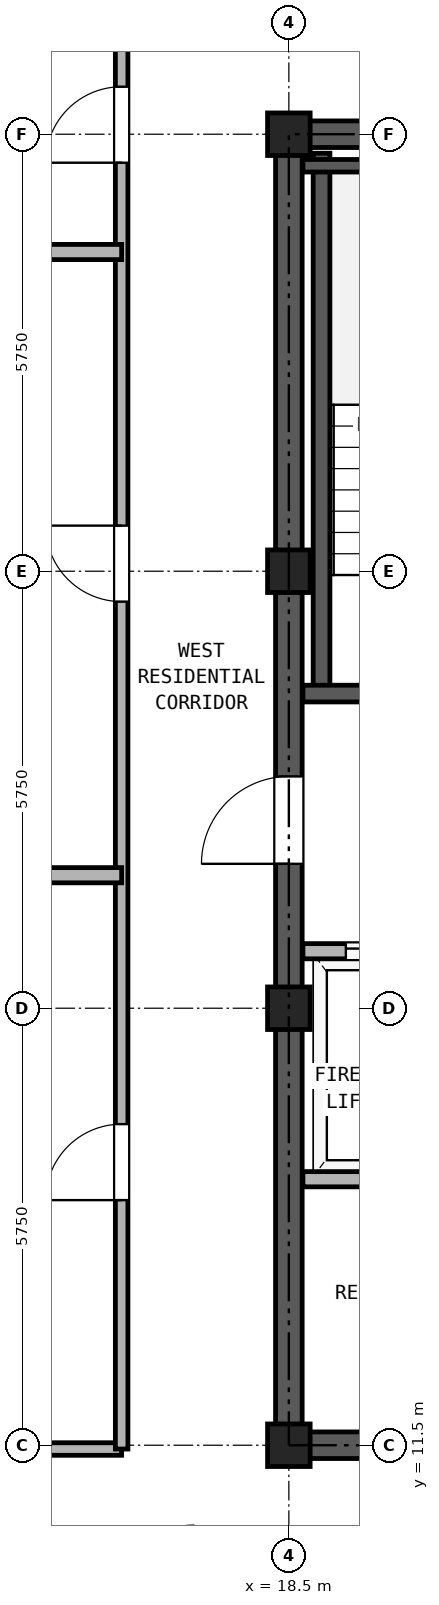
"""IFC4 building model, lengths in metres.
Left out: names, types, materials, properties, quantities, classifications, styles, units other than length and angle.
Written with IfcOpenShell. Run it as: python <this file> out.ifc"""

import sys

from ifc_helpers import new_model, si_unit, direction, frame, frame_2d, origin, origin_2d, place, context, subcontext, project, spatial, rectangle, hollow_rectangle, extrude, source, transform, mapped, element, fill, save


model = new_model("IFC4")
c1 = context("Model", 3, precision=1e-05, world=origin(), true_north=direction((0.0, 1.0)))
c2 = subcontext(c1, "Body", "Model", "MODEL_VIEW")
j1 = project(units=[si_unit("LENGTHUNIT", "METRE"), si_unit("PLANEANGLEUNIT", "RADIAN")], contexts=[c1])
p1 = place(None, origin())
s1 = spatial("IfcSite", under=j1, at=p1, CompositionType="ELEMENT")
p2 = place(p1, origin())
s2 = spatial("IfcBuilding", under=s1, at=p2, CompositionType="ELEMENT")
p3 = place(p2, frame((0.0, 0.0, 236.1)))
s3 = spatial("IfcBuildingStorey", under=s2, at=p3, CompositionType="ELEMENT", Elevation=236.1)
m1 = source(origin(), c2, "Body", "SweptSolid", [
    extrude(hollow_rectangle(XDim=0.56, YDim=0.56, WallThickness=0.03, at=origin_2d()), origin(), (0.0, 0.0, 1.0), 2.98),
])
for number, where, z_axis, x_axis in (
    (1, (18.5, 11.5, 0.0), (0.0, 0.0, 1.0), (1.0, 0.0, 0.0)),
    (2, (18.5, 17.25, 0.0), (0.0, 0.0, 1.0), (1.0, 0.0, 0.0)),
    (3, (18.5, 23.0, 0.0), (0.0, 0.0, 1.0), (1.0, 0.0, 0.0)),
    (4, (18.5, 28.75, 0.0), (0.0, 0.0, 1.0), (1.0, 0.0, 0.0)),
):
    element("IfcColumn", number, at=place(p3, frame(where, z_axis=z_axis, x_axis=x_axis)), inside=s3, PredefinedType="COLUMN", context=c2, shape_type="MappedRepresentation", body=[
        mapped(m1, transform((0.0, 0.0, 0.0), x_axis=(1.0, 0.0, 0.0), y_axis=(0.0, 1.0, 0.0), z_axis=(0.0, 0.0, 1.0), scale=1.0)),
    ])
p4 = place(p3, frame((18.325, 11.5, 0.0), z_axis=(0.0, 0.0, 1.0), x_axis=(1.0, 0.0, 0.0)))
e5 = element("IfcWall", 5, at=p4, inside=s3, PredefinedType="SHEAR", context=c2, shape_type="SweptSolid", body=[
    extrude(rectangle(XDim=10.35, YDim=0.35, at=frame_2d((5.175, 0.0))), origin(), (0.0, 0.0, 1.0), 2.98),
])
p5 = place(p4, frame((1.775, 0.0, 0.0)))
e6 = element("IfcOpeningElement", 6, at=p5, cuts=e5, PredefinedType="OPENING", context=c2, shape_type="SweptSolid", body=[
    extrude(rectangle(XDim=0.95, YDim=2.15, at=frame_2d((0.475, 1.075))), frame((0.0, 0.185, 0.0), z_axis=(0.0, -1.0, 0.0), x_axis=(1.0, 0.0, 0.0)), (0.0, 0.0, 1.0), 0.37),
])
p6 = place(p4, frame((5.275, 0.0, 0.0)))
e7 = element("IfcOpeningElement", 7, at=p6, cuts=e5, PredefinedType="OPENING", context=c2, shape_type="SweptSolid", body=[
    extrude(rectangle(XDim=0.95, YDim=2.15, at=frame_2d((0.475, 1.075))), frame((0.0, 0.185, 0.0), z_axis=(0.0, -1.0, 0.0), x_axis=(1.0, 0.0, 0.0)), (0.0, 0.0, 1.0), 0.37),
])
p7 = place(p4, frame((8.175, 0.0, 0.0)))
e8 = element("IfcOpeningElement", 8, at=p7, cuts=e5, PredefinedType="OPENING", context=c2, shape_type="SweptSolid", body=[
    extrude(rectangle(XDim=1.1, YDim=2.25, at=frame_2d((0.55, 1.125))), frame((0.0, 0.185, 0.0), z_axis=(0.0, -1.0, 0.0), x_axis=(1.0, 0.0, 0.0)), (0.0, 0.0, 1.0), 0.37),
])
p8 = place(p3, frame((18.325, 28.75, 0.0), z_axis=(0.0, 0.0, 1.0), x_axis=(1.0, 0.0, 0.0)))
e9 = element("IfcWall", 9, at=p8, inside=s3, PredefinedType="SHEAR", context=c2, shape_type="SweptSolid", body=[
    extrude(rectangle(XDim=10.35, YDim=0.35, at=frame_2d((5.175, 0.0))), origin(), (0.0, 0.0, 1.0), 2.98),
])
p9 = place(p8, frame((4.055, 0.0, 0.0)))
e10 = element("IfcOpeningElement", 10, at=p9, cuts=e9, PredefinedType="OPENING", context=c2, shape_type="SweptSolid", body=[
    extrude(rectangle(XDim=0.9, YDim=2.05, at=frame_2d((0.45, 1.025))), frame((0.0, 0.185, 0.0), z_axis=(0.0, -1.0, 0.0), x_axis=(1.0, 0.0, 0.0)), (0.0, 0.0, 1.0), 0.37),
])
p10 = place(p8, frame((5.595, 0.0, 0.0)))
e11 = element("IfcOpeningElement", 11, at=p10, cuts=e9, PredefinedType="OPENING", context=c2, shape_type="SweptSolid", body=[
    extrude(rectangle(XDim=0.9, YDim=2.05, at=frame_2d((0.45, 1.025))), frame((0.0, 0.185, 0.0), z_axis=(0.0, -1.0, 0.0), x_axis=(1.0, 0.0, 0.0)), (0.0, 0.0, 1.0), 0.37),
])
p11 = place(p3, frame((18.5, 11.675, 0.0), z_axis=(0.0, 0.0, 1.0), x_axis=(0.0, 1.0, 0.0)))
e12 = element("IfcWall", 12, at=p11, inside=s3, PredefinedType="SHEAR", context=c2, shape_type="SweptSolid", body=[
    extrude(rectangle(XDim=16.9, YDim=0.35, at=frame_2d((8.45, 0.0))), origin(), (0.0, 0.0, 1.0), 2.98),
])
p12 = place(p11, frame((7.475, 0.0, 0.0)))
e13 = element("IfcOpeningElement", 13, at=p12, cuts=e12, PredefinedType="OPENING", context=c2, shape_type="SweptSolid", body=[
    extrude(rectangle(XDim=1.15, YDim=2.2, at=frame_2d((0.575, 1.1))), frame((0.0, 0.185, 0.0), z_axis=(0.0, -1.0, 0.0), x_axis=(1.0, 0.0, 0.0)), (0.0, 0.0, 1.0), 0.37),
])
p13 = place(p3, frame((18.93, 21.39, 0.0), z_axis=(0.0, 0.0, 1.0), x_axis=(0.0, 1.0, 0.0)))
e14 = element("IfcWall", 14, at=p13, inside=s3, PredefinedType="SOLIDWALL", context=c2, shape_type="SweptSolid", body=[
    extrude(rectangle(XDim=7.11, YDim=0.22, at=frame_2d((3.555, 0.0))), origin(), (0.0, 0.0, 1.0), 2.98),
])
p14 = place(p3, frame((18.685, 28.335, 0.0), z_axis=(0.0, 0.0, 1.0), x_axis=(1.0, 0.0, 0.0)))
e15 = element("IfcWall", 15, at=p14, inside=s3, PredefinedType="PARTITIONING", context=c2, shape_type="SweptSolid", body=[
    extrude(rectangle(XDim=3.425, YDim=0.165, at=frame_2d((1.712, 0.0))), origin(), (0.0, 0.0, 1.0), 2.98),
])
p15 = place(p3, frame((18.685, 21.39, 0.0), z_axis=(0.0, 0.0, 1.0), x_axis=(1.0, 0.0, 0.0)))
e16 = element("IfcWall", 16, at=p15, inside=s3, PredefinedType="SOLIDWALL", context=c2, shape_type="SweptSolid", body=[
    extrude(rectangle(XDim=6.445, YDim=0.22, at=frame_2d((3.222, 0.0))), origin(), (0.0, 0.0, 1.0), 2.98),
])
p16 = place(p15, frame((1.165, 0.0, 0.0)))
e17 = element("IfcOpeningElement", 17, at=p16, cuts=e16, PredefinedType="OPENING", context=c2, shape_type="SweptSolid", body=[
    extrude(rectangle(XDim=1.15, YDim=2.2, at=frame_2d((0.575, 1.1))), frame((0.0, 0.12, 0.0), z_axis=(0.0, -1.0, 0.0), x_axis=(1.0, 0.0, 0.0)), (0.0, 0.0, 1.0), 0.24),
])
p17 = place(p15, frame((4.895, 0.0, 0.0)))
e18 = element("IfcOpeningElement", 18, at=p17, cuts=e16, PredefinedType="OPENING", context=c2, shape_type="SweptSolid", body=[
    extrude(rectangle(XDim=1.1, YDim=2.25, at=frame_2d((0.55, 1.125))), frame((0.0, 0.12, 0.0), z_axis=(0.0, -1.0, 0.0), x_axis=(1.0, 0.0, 0.0)), (0.0, 0.0, 1.0), 0.24),
])
p18 = place(p3, frame((18.685, 18.0, 0.0), z_axis=(0.0, 0.0, 1.0), x_axis=(1.0, 0.0, 0.0)))
e19 = element("IfcWall", 19, at=p18, inside=s3, PredefinedType="PARTITIONING", context=c2, shape_type="SweptSolid", body=[
    extrude(rectangle(XDim=9.63, YDim=0.2, at=frame_2d((4.815, 0.0))), origin(), (0.0, 0.0, 1.0), 2.98),
])
p19 = place(p18, frame((0.565, 0.0, 0.0)))
e20 = element("IfcOpeningElement", 20, at=p19, cuts=e19, PredefinedType="OPENING", context=c2, shape_type="SweptSolid", body=[
    extrude(rectangle(XDim=1.3, YDim=2.3, at=frame_2d((0.65, 1.15))), frame((0.0, 0.11, 0.0), z_axis=(0.0, -1.0, 0.0), x_axis=(1.0, 0.0, 0.0)), (0.0, 0.0, 1.0), 0.22),
])
p20 = place(p18, frame((2.665, 0.0, 0.0)))
e21 = element("IfcOpeningElement", 21, at=p20, cuts=e19, PredefinedType="OPENING", context=c2, shape_type="SweptSolid", body=[
    extrude(rectangle(XDim=1.3, YDim=2.3, at=frame_2d((0.65, 1.15))), frame((0.0, 0.11, 0.0), z_axis=(0.0, -1.0, 0.0), x_axis=(1.0, 0.0, 0.0)), (0.0, 0.0, 1.0), 0.22),
])
p21 = place(p18, frame((5.065, 0.0, 0.0)))
e22 = element("IfcOpeningElement", 22, at=p21, cuts=e19, PredefinedType="OPENING", context=c2, shape_type="SweptSolid", body=[
    extrude(rectangle(XDim=0.9, YDim=2.05, at=frame_2d((0.45, 1.025))), frame((0.0, 0.11, 0.0), z_axis=(0.0, -1.0, 0.0), x_axis=(1.0, 0.0, 0.0)), (0.0, 0.0, 1.0), 0.22),
])
p22 = place(p18, frame((7.765, 0.0, 0.0)))
e23 = element("IfcOpeningElement", 23, at=p22, cuts=e19, PredefinedType="OPENING", context=c2, shape_type="SweptSolid", body=[
    extrude(rectangle(XDim=0.9, YDim=2.05, at=frame_2d((0.45, 1.025))), frame((0.0, 0.11, 0.0), z_axis=(0.0, -1.0, 0.0), x_axis=(1.0, 0.0, 0.0)), (0.0, 0.0, 1.0), 0.22),
])
p23 = place(p3, frame((18.685, 15.0, 0.0), z_axis=(0.0, 0.0, 1.0), x_axis=(1.0, 0.0, 0.0)))
e24 = element("IfcWall", 24, at=p23, inside=s3, PredefinedType="PARTITIONING", context=c2, shape_type="SweptSolid", body=[
    extrude(rectangle(XDim=9.63, YDim=0.2, at=frame_2d((4.815, 0.0))), origin(), (0.0, 0.0, 1.0), 2.98),
])
p24 = place(p3, frame((8.56, 11.45, 0.0), z_axis=(0.0, 0.0, 1.0), x_axis=(1.0, 0.0, 0.0)))
e25 = element("IfcWall", 25, at=p24, inside=s3, PredefinedType="PARTITIONING", context=c2, shape_type="SweptSolid", body=[
    extrude(rectangle(XDim=7.74, YDim=0.165, at=frame_2d((3.87, 0.0))), origin(), (0.0, 0.0, 1.0), 2.428),
])
p25 = place(p3, frame((16.3, 11.45, 0.0), z_axis=(0.0, 0.0, 1.0), x_axis=(0.0, 1.0, 0.0)))
e26 = element("IfcWall", 26, at=p25, inside=s3, PredefinedType="PARTITIONING", context=c2, shape_type="SweptSolid", body=[
    extrude(rectangle(XDim=23.69, YDim=0.165, at=frame_2d((11.845, 0.0))), origin(), (0.0, 0.0, 1.0), 2.98),
])
p26 = place(p25, frame((3.275, 0.0, 0.0)))
e27 = element("IfcOpeningElement", 27, at=p26, cuts=e26, PredefinedType="OPENING", context=c2, shape_type="SweptSolid", body=[
    extrude(rectangle(XDim=1.0, YDim=2.15, at=frame_2d((0.5, 1.075))), frame((0.0, 0.093, 0.0), z_axis=(0.0, -1.0, 0.0), x_axis=(1.0, 0.0, 0.0)), (0.0, 0.0, 1.0), 0.185),
])
p27 = place(p25, frame((11.15, 0.0, 0.0)))
e28 = element("IfcOpeningElement", 28, at=p27, cuts=e26, PredefinedType="OPENING", context=c2, shape_type="SweptSolid", body=[
    extrude(rectangle(XDim=1.0, YDim=2.15, at=frame_2d((0.5, 1.075))), frame((0.0, 0.093, 0.0), z_axis=(0.0, -1.0, 0.0), x_axis=(1.0, 0.0, 0.0)), (0.0, 0.0, 1.0), 0.185),
])
p28 = place(p25, frame((16.925, 0.0, 0.0)))
e29 = element("IfcOpeningElement", 29, at=p28, cuts=e26, PredefinedType="OPENING", context=c2, shape_type="SweptSolid", body=[
    extrude(rectangle(XDim=1.0, YDim=2.15, at=frame_2d((0.5, 1.075))), frame((0.0, 0.093, 0.0), z_axis=(0.0, -1.0, 0.0), x_axis=(1.0, 0.0, 0.0)), (0.0, 0.0, 1.0), 0.185),
])
for number, where, z_axis, x_axis in (
    (30, (5.36, 19.0, 0.0), (0.0, 0.0, 1.0), (1.0, 0.0, 0.0)),
    (31, (5.36, 27.2, 0.0), (0.0, 0.0, 1.0), (1.0, 0.0, 0.0)),
):
    element("IfcWall", number, at=place(p3, frame(where, z_axis=z_axis, x_axis=x_axis)), inside=s3, PredefinedType="PARTITIONING", context=c2, shape_type="SweptSolid", body=[
        extrude(rectangle(XDim=10.94, YDim=0.2, at=frame_2d((5.47, 0.0))), origin(), (0.0, 0.0, 1.0), 2.98),
    ])
p29 = place(p19, origin())
e32 = element("IfcDoor", 32, at=p29, inside=s3, OperationType="DOUBLE_DOOR_SLIDING", PredefinedType="DOOR", context=c2, shape_type="SweptSolid", body=[
    extrude(rectangle(XDim=1.3, YDim=2.3, at=frame_2d((0.65, 1.15))), frame((0.0, 0.025, 0.0), z_axis=(0.0, -1.0, 0.0), x_axis=(1.0, 0.0, 0.0)), (0.0, 0.0, 1.0), 0.05),
])
fill(e20, e32)
p30 = place(p12, frame((1.15, 0.0, 0.0), z_axis=(0.0, 0.0, 1.0), x_axis=(-1.0, 0.0, 0.0)))
e33 = element("IfcDoor", 33, at=p30, inside=s3, OperationType="SINGLE_SWING_LEFT", PredefinedType="DOOR", context=c2, shape_type="SweptSolid", body=[
    extrude(rectangle(XDim=1.15, YDim=2.2, at=frame_2d((0.575, 1.1))), frame((0.0, 0.025, 0.0), z_axis=(0.0, -1.0, 0.0), x_axis=(1.0, 0.0, 0.0)), (0.0, 0.0, 1.0), 0.05),
])
fill(e13, e33)
p31 = place(p26, origin())
e34 = element("IfcDoor", 34, at=p31, inside=s3, OperationType="SINGLE_SWING_LEFT", PredefinedType="DOOR", context=c2, shape_type="SweptSolid", body=[
    extrude(rectangle(XDim=1.0, YDim=2.15, at=frame_2d((0.5, 1.075))), frame((0.0, 0.025, 0.0), z_axis=(0.0, -1.0, 0.0), x_axis=(1.0, 0.0, 0.0)), (0.0, 0.0, 1.0), 0.05),
])
fill(e27, e34)
p32 = place(p27, origin())
e35 = element("IfcDoor", 35, at=p32, inside=s3, OperationType="SINGLE_SWING_RIGHT", PredefinedType="DOOR", context=c2, shape_type="SweptSolid", body=[
    extrude(rectangle(XDim=1.0, YDim=2.15, at=frame_2d((0.5, 1.075))), frame((0.0, 0.025, 0.0), z_axis=(0.0, -1.0, 0.0), x_axis=(1.0, 0.0, 0.0)), (0.0, 0.0, 1.0), 0.05),
])
fill(e28, e35)
p33 = place(p28, origin())
e36 = element("IfcDoor", 36, at=p33, inside=s3, OperationType="SINGLE_SWING_LEFT", PredefinedType="DOOR", context=c2, shape_type="SweptSolid", body=[
    extrude(rectangle(XDim=1.0, YDim=2.15, at=frame_2d((0.5, 1.075))), frame((0.0, 0.025, 0.0), z_axis=(0.0, -1.0, 0.0), x_axis=(1.0, 0.0, 0.0)), (0.0, 0.0, 1.0), 0.05),
])
fill(e29, e36)
save(model, sys.argv[1])
